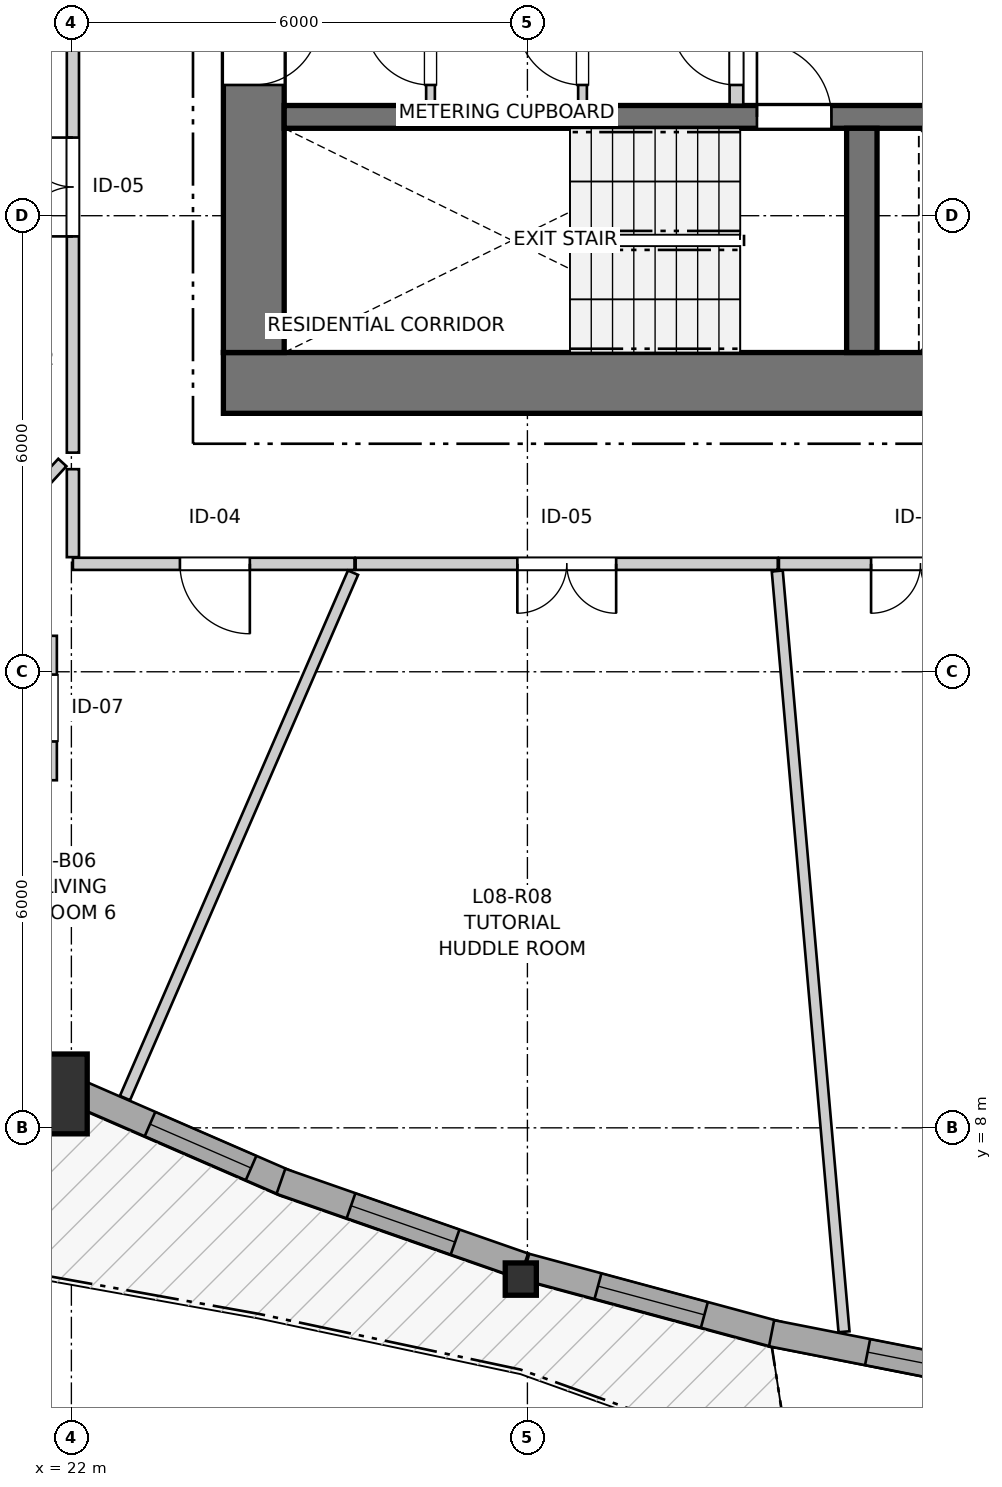
"""IFC4 building model, lengths in metres.
Left out: names, types, materials, properties, quantities, classifications, styles, units other than length and angle.
Written with IfcOpenShell. Run it as: python <this file> out.ifc"""

import sys

from ifc_helpers import new_model, si_unit, direction, frame, frame_2d, origin, origin_2d, place, context, subcontext, project, spatial, rectangle, i_section, extrude, source, transform, mapped, element, fill, save


model = new_model("IFC4")
c1 = context("Model", 3, precision=1e-05, world=origin(), true_north=direction((0.0, 1.0)))
c2 = subcontext(c1, "Body", "Model", "MODEL_VIEW")
j1 = project(units=[si_unit("LENGTHUNIT", "METRE"), si_unit("PLANEANGLEUNIT", "RADIAN")], contexts=[c1])
p1 = place(None, origin())
s1 = spatial("IfcSite", under=j1, at=p1, CompositionType="ELEMENT")
p2 = place(p1, origin())
s2 = spatial("IfcBuilding", under=s1, at=p2, CompositionType="ELEMENT")
p3 = place(p2, frame((0.0, 0.0, 30.2)))
s3 = spatial("IfcBuildingStorey", under=s2, at=p3, CompositionType="ELEMENT", Elevation=30.2)
p4 = place(p3, frame((24.0, 17.8, 0.0), z_axis=(0.0, 0.0, 1.0), x_axis=(1.0, 0.0, 0.0)))
e1 = element("IfcWall", 1, at=p4, inside=s3, PredefinedType="SHEAR", context=c2, shape_type="SweptSolid", body=[
    extrude(rectangle(XDim=12.7, YDim=0.8, at=frame_2d((6.35, 0.0))), origin(), (0.0, 0.0, 1.0), 2.935),
])
p5 = place(p3, frame((24.4, 33.8, 0.0), z_axis=(0.0, 0.0, 1.0), x_axis=(0.0, -1.0, 0.0)))
e2 = element("IfcWall", 2, at=p5, inside=s3, PredefinedType="SHEAR", context=c2, shape_type="SweptSolid", body=[
    extrude(rectangle(XDim=15.6, YDim=0.8, at=frame_2d((7.8, 0.0))), origin(), (0.0, 0.0, 1.0), 2.935),
])
p6 = place(p5, frame((7.05, 0.0, 0.0)))
e3 = element("IfcOpeningElement", 3, at=p6, cuts=e2, PredefinedType="OPENING", context=c2, shape_type="SweptSolid", body=[
    extrude(rectangle(XDim=1.5, YDim=2.15, at=frame_2d((0.75, 1.075))), frame((0.0, 0.41, 0.0), z_axis=(0.0, -1.0, 0.0), x_axis=(1.0, 0.0, 0.0)), (0.0, 0.0, 1.0), 0.82),
])
p7 = place(p5, frame((3.52, 0.0, 0.0)))
e4 = element("IfcOpeningElement", 4, at=p7, cuts=e2, PredefinedType="OPENING", context=c2, shape_type="SweptSolid", body=[
    extrude(rectangle(XDim=0.86, YDim=2.05, at=frame_2d((0.43, 1.025))), frame((0.0, 0.41, 0.0), z_axis=(0.0, -1.0, 0.0), x_axis=(1.0, 0.0, 0.0)), (0.0, 0.0, 1.0), 0.82),
])
p8 = place(p5, frame((11.22, 0.0, 0.0)))
e5 = element("IfcOpeningElement", 5, at=p8, cuts=e2, PredefinedType="OPENING", context=c2, shape_type="SweptSolid", body=[
    extrude(rectangle(XDim=0.86, YDim=2.05, at=frame_2d((0.43, 1.025))), frame((0.0, 0.41, 0.0), z_axis=(0.0, -1.0, 0.0), x_axis=(1.0, 0.0, 0.0)), (0.0, 0.0, 1.0), 0.82),
])
p9 = place(p3, frame((24.8, 21.3, 0.0), z_axis=(0.0, 0.0, 1.0), x_axis=(1.0, 0.0, 0.0)))
e6 = element("IfcWall", 6, at=p9, inside=s3, PredefinedType="SHEAR", context=c2, shape_type="SweptSolid", body=[
    extrude(rectangle(XDim=11.1, YDim=0.3, at=frame_2d((5.55, 0.0))), origin(), (0.0, 0.0, 1.0), 2.935),
])
p10 = place(p9, frame((6.22, 0.0, 0.0)))
e7 = element("IfcOpeningElement", 7, at=p10, cuts=e6, PredefinedType="OPENING", context=c2, shape_type="SweptSolid", body=[
    extrude(rectangle(XDim=0.98, YDim=2.15, at=frame_2d((0.49, 1.075))), frame((0.0, 0.16, 0.0), z_axis=(0.0, -1.0, 0.0), x_axis=(1.0, 0.0, 0.0)), (0.0, 0.0, 1.0), 0.32),
])
p11 = place(p9, frame((9.15, 0.0, 0.0)))
e8 = element("IfcOpeningElement", 8, at=p11, cuts=e6, PredefinedType="OPENING", context=c2, shape_type="SweptSolid", body=[
    extrude(rectangle(XDim=1.15, YDim=2.15, at=frame_2d((0.575, 1.075))), frame((0.0, 0.16, 0.0), z_axis=(0.0, -1.0, 0.0), x_axis=(1.0, 0.0, 0.0)), (0.0, 0.0, 1.0), 0.32),
])
p12 = place(p3, frame((32.4, 18.2, 0.0), z_axis=(0.0, 0.0, 1.0), x_axis=(0.0, 1.0, 0.0)))
e9 = element("IfcWall", 9, at=p12, inside=s3, PredefinedType="SHEAR", context=c2, shape_type="SweptSolid", body=[
    extrude(rectangle(XDim=2.95, YDim=0.4, at=frame_2d((1.475, 0.0))), origin(), (0.0, 0.0, 1.0), 2.935),
])
m1 = source(origin(), c2, "Body", "SweptSolid", [
    extrude(rectangle(XDim=1.05, YDim=1.05, at=origin_2d()), origin(), (0.0, 0.0, 1.0), 2.935),
])
p13 = place(p3, frame((21.683, 8.446, 0.0), z_axis=(0.0, 0.0, 1.0), x_axis=(1.0, 0.0, 0.0)))
e10 = element("IfcColumn", 10, at=p13, inside=s3, PredefinedType="COLUMN", context=c2, shape_type="MappedRepresentation", body=[
    mapped(m1, transform((0.0, 0.0, 0.0), x_axis=(1.0, 0.0, 0.0), y_axis=(0.0, 1.0, 0.0), z_axis=(0.0, 0.0, 1.0), scale=1.0)),
])
m2 = source(origin(), c2, "Body", "SweptSolid", [
    extrude(i_section(OverallWidth=0.409, OverallDepth=0.425, WebThickness=0.03, FlangeThickness=0.048, FilletRadius=0.015, at=origin_2d()), origin(), (0.0, 0.0, 1.0), 2.935),
])
p14 = place(p3, frame((27.913, 6.01, 0.0), z_axis=(0.0, 0.0, 1.0), x_axis=(1.0, 0.0, 0.0)))
e11 = element("IfcColumn", 11, at=p14, inside=s3, PredefinedType="PILASTER", context=c2, shape_type="MappedRepresentation", body=[
    mapped(m2, transform((0.0, 0.0, 0.0), x_axis=(1.0, 0.0, 0.0), y_axis=(0.0, 1.0, 0.0), z_axis=(0.0, 0.0, 1.0), scale=1.0)),
])
p15 = place(p3, frame((22.028, 8.487, 0.0), z_axis=(0.0, 0.0, 1.0), x_axis=(0.917081449464, -0.398699906006, 0.0)))
e12 = element("IfcWall", 12, at=p15, inside=s3, PredefinedType="SOLIDWALL", context=c2, shape_type="SweptSolid", body=[
    extrude(rectangle(XDim=3.066, YDim=0.35, at=frame_2d((1.533, 0.0))), origin(), (0.0, 0.0, 1.0), 2.415),
])
p16 = place(p15, frame((1.097, 0.0, 0.82)))
e13 = element("IfcOpeningElement", 13, at=p16, cuts=e12, PredefinedType="OPENING", context=c2, shape_type="SweptSolid", body=[
    extrude(rectangle(XDim=1.45, YDim=1.25, at=frame_2d((0.725, 0.625))), frame((0.0, 0.185, 0.0), z_axis=(0.0, -1.0, 0.0), x_axis=(1.0, 0.0, 0.0)), (0.0, 0.0, 1.0), 0.37),
])
p17 = place(p3, frame((24.757, 7.297, 0.0), z_axis=(0.0, 0.0, 1.0), x_axis=(0.944122401027, -0.329595042254, 0.0)))
e14 = element("IfcWall", 14, at=p17, inside=s3, PredefinedType="SOLIDWALL", context=c2, shape_type="SweptSolid", body=[
    extrude(rectangle(XDim=3.384, YDim=0.35, at=frame_2d((1.692, 0.0))), origin(), (0.0, 0.0, 1.0), 2.415),
])
p18 = place(p17, frame((0.977, 0.0, 0.82)))
e15 = element("IfcOpeningElement", 15, at=p18, cuts=e14, PredefinedType="OPENING", context=c2, shape_type="SweptSolid", body=[
    extrude(rectangle(XDim=1.45, YDim=1.25, at=frame_2d((0.725, 0.625))), frame((0.0, 0.185, 0.0), z_axis=(0.0, -1.0, 0.0), x_axis=(1.0, 0.0, 0.0)), (0.0, 0.0, 1.0), 0.37),
])
p19 = place(p3, frame((27.978, 6.174, 0.0), z_axis=(0.0, 0.0, 1.0), x_axis=(0.965451765427, -0.260581827136, 0.0)))
e16 = element("IfcWall", 16, at=p19, inside=s3, PredefinedType="SOLIDWALL", context=c2, shape_type="SweptSolid", body=[
    extrude(rectangle(XDim=3.439, YDim=0.35, at=frame_2d((1.72, 0.0))), origin(), (0.0, 0.0, 1.0), 2.415),
])
p20 = place(p19, frame((0.985, 0.0, 0.82)))
e17 = element("IfcOpeningElement", 17, at=p20, cuts=e16, PredefinedType="OPENING", context=c2, shape_type="SweptSolid", body=[
    extrude(rectangle(XDim=1.45, YDim=1.25, at=frame_2d((0.725, 0.625))), frame((0.0, 0.185, 0.0), z_axis=(0.0, -1.0, 0.0), x_axis=(1.0, 0.0, 0.0)), (0.0, 0.0, 1.0), 0.37),
])
p21 = place(p3, frame((31.213, 5.298, 0.0), z_axis=(0.0, 0.0, 1.0), x_axis=(0.9812345335, -0.192818023709, 0.0)))
e18 = element("IfcWall", 18, at=p21, inside=s3, PredefinedType="SOLIDWALL", context=c2, shape_type="SweptSolid", body=[
    extrude(rectangle(XDim=3.232, YDim=0.35, at=frame_2d((1.616, 0.0))), origin(), (0.0, 0.0, 1.0), 2.415),
])
p22 = place(p21, frame((1.287, 0.0, 0.82)))
e19 = element("IfcOpeningElement", 19, at=p22, cuts=e18, PredefinedType="OPENING", context=c2, shape_type="SweptSolid", body=[
    extrude(rectangle(XDim=1.45, YDim=1.25, at=frame_2d((0.725, 0.625))), frame((0.0, 0.185, 0.0), z_axis=(0.0, -1.0, 0.0), x_axis=(1.0, 0.0, 0.0)), (0.0, 0.0, 1.0), 0.37),
])
p23 = place(p3, frame((30.75, 21.46, 0.0), z_axis=(0.0, 0.0, 1.0), x_axis=(0.0, 1.0, 0.0)))
e20 = element("IfcWall", 20, at=p23, inside=s3, PredefinedType="PARTITIONING", context=c2, shape_type="SweptSolid", body=[
    extrude(rectangle(XDim=3.11, YDim=0.18, at=frame_2d((1.555, 0.0))), origin(), (0.0, 0.0, 1.0), 2.935),
])
p24 = place(p23, frame((0.26, 0.0, 0.0)))
e21 = element("IfcOpeningElement", 21, at=p24, cuts=e20, PredefinedType="OPENING", context=c2, shape_type="SweptSolid", body=[
    extrude(rectangle(XDim=0.86, YDim=2.05, at=frame_2d((0.43, 1.025))), frame((0.0, 0.1, 0.0), z_axis=(0.0, -1.0, 0.0), x_axis=(1.0, 0.0, 0.0)), (0.0, 0.0, 1.0), 0.2),
])
p25 = place(p3, frame((26.725, 21.46, 0.0), z_axis=(0.0, 0.0, 1.0), x_axis=(0.0, 1.0, 0.0)))
e22 = element("IfcWall", 22, at=p25, inside=s3, PredefinedType="PARTITIONING", context=c2, shape_type="SweptSolid", body=[
    extrude(rectangle(XDim=1.38, YDim=0.115, at=frame_2d((0.69, 0.0))), origin(), (0.0, 0.0, 1.0), 2.935),
])
p26 = place(p25, frame((0.26, 0.0, 0.0)))
e23 = element("IfcOpeningElement", 23, at=p26, cuts=e22, PredefinedType="OPENING", context=c2, shape_type="SweptSolid", body=[
    extrude(rectangle(XDim=0.86, YDim=2.05, at=frame_2d((0.43, 1.025))), frame((0.0, 0.067, 0.0), z_axis=(0.0, -1.0, 0.0), x_axis=(1.0, 0.0, 0.0)), (0.0, 0.0, 1.0), 0.135),
])
p27 = place(p3, frame((28.725, 21.46, 0.0), z_axis=(0.0, 0.0, 1.0), x_axis=(0.0, 1.0, 0.0)))
e24 = element("IfcWall", 24, at=p27, inside=s3, PredefinedType="PARTITIONING", context=c2, shape_type="SweptSolid", body=[
    extrude(rectangle(XDim=1.38, YDim=0.115, at=frame_2d((0.69, 0.0))), origin(), (0.0, 0.0, 1.0), 2.935),
])
p28 = place(p27, frame((0.26, 0.0, 0.0)))
e25 = element("IfcOpeningElement", 25, at=p28, cuts=e24, PredefinedType="OPENING", context=c2, shape_type="SweptSolid", body=[
    extrude(rectangle(XDim=0.86, YDim=2.05, at=frame_2d((0.43, 1.025))), frame((0.0, 0.067, 0.0), z_axis=(0.0, -1.0, 0.0), x_axis=(1.0, 0.0, 0.0)), (0.0, 0.0, 1.0), 0.135),
])
p29 = place(p3, frame((22.02, 16.883, 0.0), z_axis=(0.0, 0.0, 1.0), x_axis=(0.0, 1.0, 0.0)))
e26 = element("IfcWall", 26, at=p29, inside=s3, PredefinedType="PARTITIONING", context=c2, shape_type="SweptSolid", body=[
    extrude(rectangle(XDim=7.267, YDim=0.16, at=frame_2d((3.633, 0.0))), origin(), (0.0, 0.0, 1.0), 2.935),
])
p30 = place(p29, frame((2.845, 0.0, 0.0)))
e27 = element("IfcOpeningElement", 27, at=p30, cuts=e26, PredefinedType="OPENING", context=c2, shape_type="SweptSolid", body=[
    extrude(rectangle(XDim=1.3, YDim=2.1, at=frame_2d((0.65, 1.05))), frame((0.0, 0.09, 0.0), z_axis=(0.0, -1.0, 0.0), x_axis=(1.0, 0.0, 0.0)), (0.0, 0.0, 1.0), 0.18),
])
p31 = place(p3, frame((31.294, 15.42, 0.0), z_axis=(0.0, 0.0, 1.0), x_axis=(-1.0, 0.0, 0.0)))
e28 = element("IfcWall", 28, at=p31, inside=s3, PredefinedType="PARTITIONING", context=c2, shape_type="SweptSolid", body=[
    extrude(rectangle(XDim=5.554, YDim=0.16, at=frame_2d((2.777, 0.0))), origin(), (0.0, 0.0, 1.0), 2.935),
])
p32 = place(p31, frame((2.126, 0.0, 0.0)))
e29 = element("IfcOpeningElement", 29, at=p32, cuts=e28, PredefinedType="OPENING", context=c2, shape_type="SweptSolid", body=[
    extrude(rectangle(XDim=1.3, YDim=2.1, at=frame_2d((0.65, 1.05))), frame((0.0, 0.09, 0.0), z_axis=(0.0, -1.0, 0.0), x_axis=(1.0, 0.0, 0.0)), (0.0, 0.0, 1.0), 0.18),
])
p33 = place(p3, frame((35.08, 15.42, 0.0), z_axis=(0.0, 0.0, 1.0), x_axis=(-1.0, 0.0, 0.0)))
e30 = element("IfcWall", 30, at=p33, inside=s3, PredefinedType="PARTITIONING", context=c2, shape_type="SweptSolid", body=[
    extrude(rectangle(XDim=3.771, YDim=0.16, at=frame_2d((1.885, 0.0))), origin(), (0.0, 0.0, 1.0), 2.935),
])
p34 = place(p33, frame((1.259, 0.0, 0.0)))
e31 = element("IfcOpeningElement", 31, at=p34, cuts=e30, PredefinedType="OPENING", context=c2, shape_type="SweptSolid", body=[
    extrude(rectangle(XDim=1.3, YDim=2.1, at=frame_2d((0.65, 1.05))), frame((0.0, 0.09, 0.0), z_axis=(0.0, -1.0, 0.0), x_axis=(1.0, 0.0, 0.0)), (0.0, 0.0, 1.0), 0.18),
])
p35 = place(p3, frame((25.725, 15.42, 0.0), z_axis=(0.0, 0.0, 1.0), x_axis=(-1.0, 0.0, 0.0)))
e32 = element("IfcWall", 32, at=p35, inside=s3, PredefinedType="PARTITIONING", context=c2, shape_type="SweptSolid", body=[
    extrude(rectangle(XDim=3.705, YDim=0.16, at=frame_2d((1.853, 0.0))), origin(), (0.0, 0.0, 1.0), 2.935),
])
p36 = place(p35, frame((1.377, 0.0, 0.0)))
e33 = element("IfcOpeningElement", 33, at=p36, cuts=e32, PredefinedType="OPENING", context=c2, shape_type="SweptSolid", body=[
    extrude(rectangle(XDim=0.92, YDim=2.1, at=frame_2d((0.46, 1.05))), frame((0.0, 0.09, 0.0), z_axis=(0.0, -1.0, 0.0), x_axis=(1.0, 0.0, 0.0)), (0.0, 0.0, 1.0), 0.18),
])
p37 = place(p3, frame((21.744, 12.573, 0.0), z_axis=(0.0, 0.0, 1.0), x_axis=(0.0, 1.0, 0.0)))
e34 = element("IfcWall", 34, at=p37, inside=s3, PredefinedType="PARTITIONING", context=c2, shape_type="SweptSolid", body=[
    extrude(rectangle(XDim=1.9, YDim=0.13, at=frame_2d((0.95, 0.0))), origin(), (0.0, 0.0, 1.0), 2.935),
])
p38 = place(p37, frame((0.51, 0.0, 0.0)))
e35 = element("IfcOpeningElement", 35, at=p38, cuts=e34, PredefinedType="OPENING", context=c2, shape_type="SweptSolid", body=[
    extrude(rectangle(XDim=0.88, YDim=2.05, at=frame_2d((0.44, 1.025))), frame((0.0, 0.075, 0.0), z_axis=(0.0, -1.0, 0.0), x_axis=(1.0, 0.0, 0.0)), (0.0, 0.0, 1.0), 0.15),
])
p39 = place(p3, frame((31.287, 15.326, 0.0), z_axis=(0.0, 0.0, 1.0), x_axis=(0.087404477037, -0.99617290537, 0.0)))
e36 = element("IfcWall", 36, at=p39, inside=s3, PredefinedType="PARTITIONING", context=c2, shape_type="SweptSolid", body=[
    extrude(rectangle(XDim=10.047, YDim=0.145, at=frame_2d((5.023, 0.0))), origin(), (0.0, 0.0, 1.0), 2.935),
])
p40 = place(p3, frame((22.705, 8.392, 0.0), z_axis=(0.0, 0.0, 1.0), x_axis=(0.398228422372, 0.917286282256, 0.0)))
e37 = element("IfcWall", 37, at=p40, inside=s3, PredefinedType="PARTITIONING", context=c2, shape_type="SweptSolid", body=[
    extrude(rectangle(XDim=7.535, YDim=0.145, at=frame_2d((3.767, 0.0))), origin(), (0.0, 0.0, 1.0), 2.935),
])
p41 = place(p3, frame((17.064, 11.493, 0.0), z_axis=(0.0, 0.0, 1.0), x_axis=(0.67534166785, 0.737505004502, 0.0)))
e38 = element("IfcWall", 38, at=p41, inside=s3, PredefinedType="PARTITIONING", context=c2, shape_type="SweptSolid", body=[
    extrude(rectangle(XDim=7.132, YDim=0.145, at=frame_2d((3.566, 0.0))), origin(), (0.0, 0.0, 1.0), 2.935),
])
p42 = place(p3, frame((22.02, 15.508, 0.0), z_axis=(0.0, 0.0, 1.0), x_axis=(0.0, 1.0, 0.0)))
e39 = element("IfcWall", 39, at=p42, inside=s3, PredefinedType="PARTITIONING", context=c2, shape_type="SweptSolid", body=[
    extrude(rectangle(XDim=1.157, YDim=0.16, at=frame_2d((0.579, 0.0))), origin(), (0.0, 0.0, 1.0), 2.935),
])
m3 = source(origin(), c2, "Body", "SweptSolid", [
    extrude(rectangle(XDim=1.45, YDim=1.25, at=frame_2d((0.725, 0.625))), frame((0.0, 0.03, 0.0), z_axis=(0.0, -1.0, 0.0), x_axis=(1.0, 0.0, 0.0)), (0.0, 0.0, 1.0), 0.06),
])
p43 = place(p16, origin())
e40 = element("IfcWindow", 40, at=p43, inside=s3, PartitioningType="SINGLE_PANEL", PredefinedType="WINDOW", context=c2, shape_type="MappedRepresentation", body=[
    mapped(m3, transform((0.0, 0.0, 0.0), x_axis=(1.0, 0.0, 0.0), y_axis=(0.0, 1.0, 0.0), z_axis=(0.0, 0.0, 1.0), scale=1.0)),
])
fill(e13, e40)
p44 = place(p18, origin())
e41 = element("IfcWindow", 41, at=p44, inside=s3, PartitioningType="SINGLE_PANEL", PredefinedType="WINDOW", context=c2, shape_type="MappedRepresentation", body=[
    mapped(m3, transform((0.0, 0.0, 0.0), x_axis=(1.0, 0.0, 0.0), y_axis=(0.0, 1.0, 0.0), z_axis=(0.0, 0.0, 1.0), scale=1.0)),
])
fill(e15, e41)
p45 = place(p20, origin())
e42 = element("IfcWindow", 42, at=p45, inside=s3, PartitioningType="SINGLE_PANEL", PredefinedType="WINDOW", context=c2, shape_type="MappedRepresentation", body=[
    mapped(m3, transform((0.0, 0.0, 0.0), x_axis=(1.0, 0.0, 0.0), y_axis=(0.0, 1.0, 0.0), z_axis=(0.0, 0.0, 1.0), scale=1.0)),
])
fill(e17, e42)
p46 = place(p22, origin())
e43 = element("IfcWindow", 43, at=p46, inside=s3, PartitioningType="SINGLE_PANEL", PredefinedType="WINDOW", context=c2, shape_type="MappedRepresentation", body=[
    mapped(m3, transform((0.0, 0.0, 0.0), x_axis=(1.0, 0.0, 0.0), y_axis=(0.0, 1.0, 0.0), z_axis=(0.0, 0.0, 1.0), scale=1.0)),
])
fill(e19, e43)
m4 = source(origin(), c2, "Body", "SweptSolid", [
    extrude(rectangle(XDim=0.98, YDim=2.15, at=frame_2d((0.49, 1.075))), frame((0.0, 0.025, 0.0), z_axis=(0.0, -1.0, 0.0), x_axis=(1.0, 0.0, 0.0)), (0.0, 0.0, 1.0), 0.05),
])
p47 = place(p10, origin())
e44 = element("IfcDoor", 44, at=p47, inside=s3, OperationType="SINGLE_SWING_LEFT", PredefinedType="DOOR", context=c2, shape_type="MappedRepresentation", body=[
    mapped(m4, transform((0.0, 0.0, 0.0), x_axis=(1.0, 0.0, 0.0), y_axis=(0.0, 1.0, 0.0), z_axis=(0.0, 0.0, 1.0), scale=1.0)),
])
fill(e7, e44)
m5 = source(origin(), c2, "Body", "SweptSolid", [
    extrude(rectangle(XDim=0.86, YDim=2.05, at=frame_2d((0.43, 1.025))), frame((0.0, 0.025, 0.0), z_axis=(0.0, -1.0, 0.0), x_axis=(1.0, 0.0, 0.0)), (0.0, 0.0, 1.0), 0.05),
])
p48 = place(p8, origin())
e45 = element("IfcDoor", 45, at=p48, inside=s3, OperationType="SINGLE_SWING_LEFT", PredefinedType="DOOR", context=c2, shape_type="MappedRepresentation", body=[
    mapped(m5, transform((0.0, 0.0, 0.0), x_axis=(1.0, 0.0, 0.0), y_axis=(0.0, 1.0, 0.0), z_axis=(0.0, 0.0, 1.0), scale=1.0)),
])
fill(e5, e45)
p49 = place(p24, origin())
e46 = element("IfcDoor", 46, at=p49, inside=s3, OperationType="SINGLE_SWING_RIGHT", PredefinedType="DOOR", context=c2, shape_type="MappedRepresentation", body=[
    mapped(m5, transform((0.0, 0.0, 0.0), x_axis=(1.0, 0.0, 0.0), y_axis=(0.0, 1.0, 0.0), z_axis=(0.0, 0.0, 1.0), scale=1.0)),
])
fill(e21, e46)
p50 = place(p26, origin())
e47 = element("IfcDoor", 47, at=p50, inside=s3, OperationType="SINGLE_SWING_RIGHT", PredefinedType="DOOR", context=c2, shape_type="MappedRepresentation", body=[
    mapped(m5, transform((0.0, 0.0, 0.0), x_axis=(1.0, 0.0, 0.0), y_axis=(0.0, 1.0, 0.0), z_axis=(0.0, 0.0, 1.0), scale=1.0)),
])
fill(e23, e47)
p51 = place(p28, origin())
e48 = element("IfcDoor", 48, at=p51, inside=s3, OperationType="SINGLE_SWING_RIGHT", PredefinedType="DOOR", context=c2, shape_type="MappedRepresentation", body=[
    mapped(m5, transform((0.0, 0.0, 0.0), x_axis=(1.0, 0.0, 0.0), y_axis=(0.0, 1.0, 0.0), z_axis=(0.0, 0.0, 1.0), scale=1.0)),
])
fill(e25, e48)
m6 = source(origin(), c2, "Body", "SweptSolid", [
    extrude(rectangle(XDim=1.3, YDim=2.1, at=frame_2d((0.65, 1.05))), frame((0.0, 0.025, 0.0), z_axis=(0.0, -1.0, 0.0), x_axis=(1.0, 0.0, 0.0)), (0.0, 0.0, 1.0), 0.05),
])
p52 = place(p30, origin())
e49 = element("IfcDoor", 49, at=p52, inside=s3, OperationType="DOUBLE_DOOR_SINGLE_SWING", PredefinedType="DOOR", context=c2, shape_type="MappedRepresentation", body=[
    mapped(m6, transform((0.0, 0.0, 0.0), x_axis=(1.0, 0.0, 0.0), y_axis=(0.0, 1.0, 0.0), z_axis=(0.0, 0.0, 1.0), scale=1.0)),
])
fill(e27, e49)
p53 = place(p32, origin())
e50 = element("IfcDoor", 50, at=p53, inside=s3, OperationType="DOUBLE_DOOR_SINGLE_SWING", PredefinedType="DOOR", context=c2, shape_type="MappedRepresentation", body=[
    mapped(m6, transform((0.0, 0.0, 0.0), x_axis=(1.0, 0.0, 0.0), y_axis=(0.0, 1.0, 0.0), z_axis=(0.0, 0.0, 1.0), scale=1.0)),
])
fill(e29, e50)
p54 = place(p34, origin())
e51 = element("IfcDoor", 51, at=p54, inside=s3, OperationType="DOUBLE_DOOR_SINGLE_SWING", PredefinedType="DOOR", context=c2, shape_type="MappedRepresentation", body=[
    mapped(m6, transform((0.0, 0.0, 0.0), x_axis=(1.0, 0.0, 0.0), y_axis=(0.0, 1.0, 0.0), z_axis=(0.0, 0.0, 1.0), scale=1.0)),
])
fill(e31, e51)
m7 = source(origin(), c2, "Body", "SweptSolid", [
    extrude(rectangle(XDim=0.92, YDim=2.1, at=frame_2d((0.46, 1.05))), frame((0.0, 0.025, 0.0), z_axis=(0.0, -1.0, 0.0), x_axis=(1.0, 0.0, 0.0)), (0.0, 0.0, 1.0), 0.05),
])
p55 = place(p36, origin())
e52 = element("IfcDoor", 52, at=p55, inside=s3, OperationType="SINGLE_SWING_LEFT", PredefinedType="DOOR", context=c2, shape_type="MappedRepresentation", body=[
    mapped(m7, transform((0.0, 0.0, 0.0), x_axis=(1.0, 0.0, 0.0), y_axis=(0.0, 1.0, 0.0), z_axis=(0.0, 0.0, 1.0), scale=1.0)),
])
fill(e33, e52)
m8 = source(origin(), c2, "Body", "SweptSolid", [
    extrude(rectangle(XDim=0.88, YDim=2.05, at=frame_2d((0.44, 1.025))), frame((0.0, 0.025, 0.0), z_axis=(0.0, -1.0, 0.0), x_axis=(1.0, 0.0, 0.0)), (0.0, 0.0, 1.0), 0.05),
])
p56 = place(p38, origin())
e53 = element("IfcDoor", 53, at=p56, inside=s3, OperationType="SINGLE_SWING_LEFT", PredefinedType="DOOR", context=c2, shape_type="MappedRepresentation", body=[
    mapped(m8, transform((0.0, 0.0, 0.0), x_axis=(1.0, 0.0, 0.0), y_axis=(0.0, 1.0, 0.0), z_axis=(0.0, 0.0, 1.0), scale=1.0)),
])
fill(e35, e53)
save(model, sys.argv[1])
